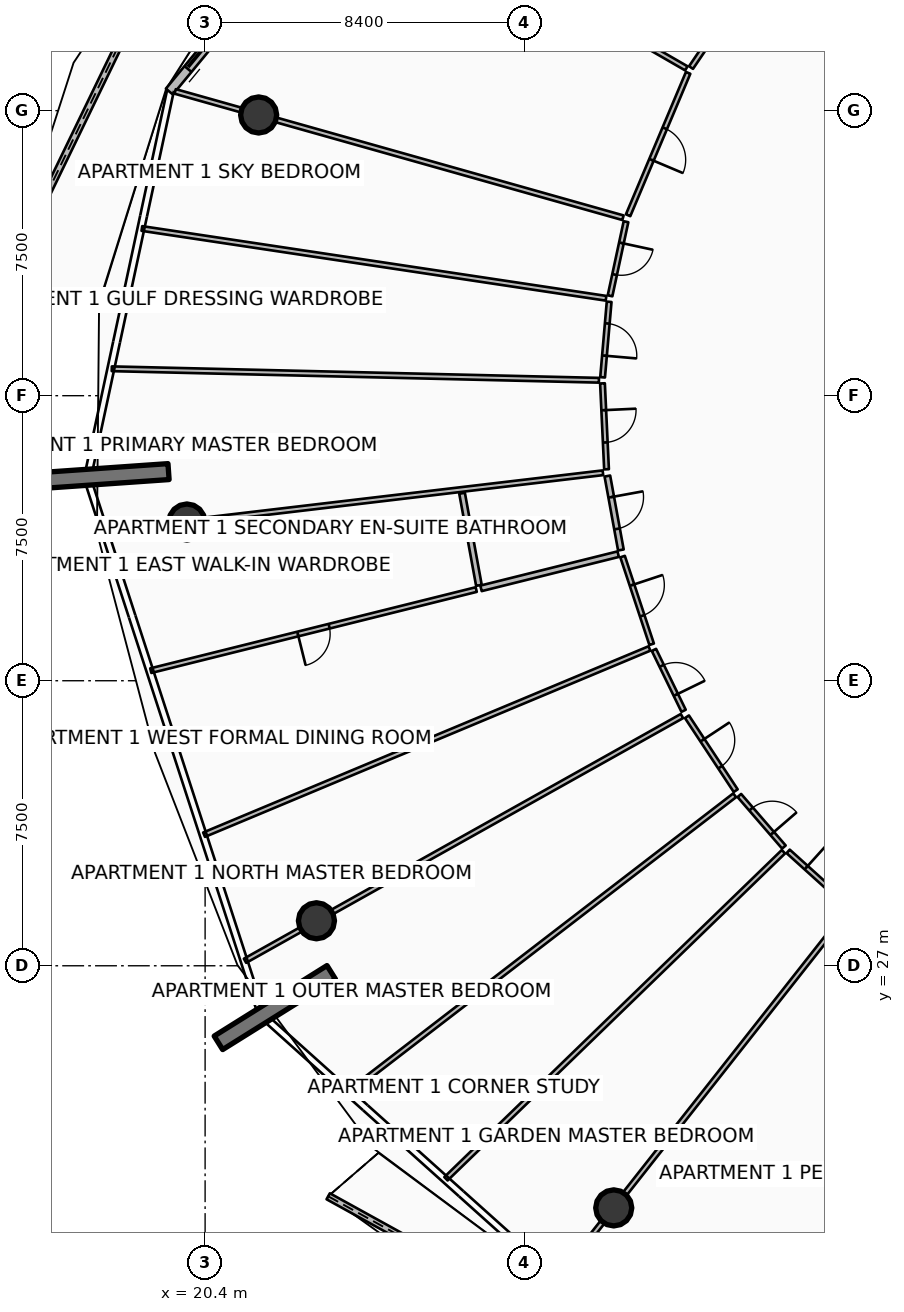
"""IFC4 building model, lengths in metres.
Left out: names, types, materials, properties, quantities, classifications, styles, units other than length and angle.
Written with IfcOpenShell. Run it as: python <this file> out.ifc"""

import sys

from ifc_helpers import new_model, si_unit, direction, frame, frame_2d, origin, origin_2d, place, context, subcontext, project, spatial, polyline, rectangle, circle, outline, extrude, element, fill, save


model = new_model("IFC4")
c1 = context("Model", 3, precision=1e-05, world=origin(), true_north=direction((0.0, 1.0)))
c2 = subcontext(c1, "Body", "Model", "MODEL_VIEW")
j1 = project(units=[si_unit("LENGTHUNIT", "METRE"), si_unit("PLANEANGLEUNIT", "RADIAN")], contexts=[c1])
p1 = place(None, origin())
s1 = spatial("IfcSite", under=j1, at=p1, CompositionType="ELEMENT")
p2 = place(p1, origin())
s2 = spatial("IfcBuilding", under=s1, at=p2, CompositionType="ELEMENT")
p3 = place(p2, frame((0.0, 0.0, 290.6)))
s3 = spatial("IfcBuildingStorey", under=s2, at=p3, CompositionType="ELEMENT", Elevation=290.6)
p4 = place(p3, frame((19.438, 40.003, 0.0), z_axis=(0.0, 0.0, 1.0), x_axis=(-0.997563824095, -0.069759707979, 0.0)))
e1 = element("IfcWall", 1, at=p4, inside=s3, PredefinedType="SOLIDWALL", context=c2, shape_type="SweptSolid", body=[
    extrude(rectangle(XDim=3.5, YDim=0.42, at=frame_2d((1.75, 0.0))), origin(), (0.0, 0.0, 1.0), 3.85),
])
p5 = place(p3, frame((23.719, 26.827, 0.0), z_axis=(0.0, 0.0, 1.0), x_axis=(-0.848033572426, -0.529942506352, 0.0)))
e2 = element("IfcWall", 2, at=p5, inside=s3, PredefinedType="SOLIDWALL", context=c2, shape_type="SweptSolid", body=[
    extrude(rectangle(XDim=3.5, YDim=0.42, at=frame_2d((1.75, 0.0))), origin(), (0.0, 0.0, 1.0), 3.85),
])
for number, where, z_axis, x_axis in (
    (3, (21.809, 49.387, 0.0), (0.0, 0.0, 1.0), (1.0, 0.0, 0.0)),
    (4, (19.92, 38.677, 0.0), (0.0, 0.0, 1.0), (1.0, 0.0, 0.0)),
    (5, (23.33, 28.184, 0.0), (0.0, 0.0, 1.0), (1.0, 0.0, 0.0)),
    (6, (31.153, 20.629, 0.0), (0.0, 0.0, 1.0), (1.0, 0.0, 0.0)),
):
    element("IfcColumn", number, at=place(p3, frame(where, z_axis=z_axis, x_axis=x_axis)), inside=s3, PredefinedType="COLUMN", context=c2, shape_type="SweptSolid", body=[
        extrude(circle(Radius=0.475, at=origin_2d()), origin(), (0.0, 0.0, 1.0), 3.59),
    ])
p6 = place(p3, frame((20.406, 55.925, 0.0), z_axis=(0.0, 0.0, 1.0), x_axis=(-0.435762237374, -0.900061815921, 0.0)))
e7 = element("IfcWall", 7, at=p6, inside=s3, PredefinedType="PARAPET", context=c2, shape_type="SweptSolid", body=[
    extrude(outline(polyline([(0.0, 0.0), (12.362, 0.0), (12.362, 1.86), (6.181, 1.798), (0.0, 1.632), (0.0, 0.0)])), frame((0.0, 0.09, 0.0), z_axis=(0.0, -1.0, 0.0), x_axis=(1.0, 0.0, 0.0)), (0.0, 0.0, 1.0), 0.18),
])
p7 = place(p3, frame((23.639, 20.935, 0.0), z_axis=(0.0, 0.0, 1.0), x_axis=(0.875454216257, -0.483301060663, 0.0)))
e8 = element("IfcWall", 8, at=p7, inside=s3, PredefinedType="PARAPET", context=c2, shape_type="SweptSolid", body=[
    extrude(outline(polyline([(0.0, 0.0), (12.029, 0.0), (12.029, 1.148), (6.015, 1.127), (0.0, 1.224), (0.0, 0.0)])), frame((0.0, 0.09, 0.0), z_axis=(0.0, -1.0, 0.0), x_axis=(1.0, 0.0, 0.0)), (0.0, 0.0, 1.0), 0.18),
])
p8 = place(p3, frame((26.742, 58.822, 0.0), z_axis=(0.0, 0.0, 1.0), x_axis=(-0.636680093065, -0.771128043255, 0.0)))
e9 = element("IfcWall", 9, at=p8, inside=s3, PredefinedType="SOLIDWALL", context=c2, shape_type="SweptSolid", body=[
    extrude(rectangle(XDim=11.438, YDim=0.24, at=frame_2d((5.719, 0.0))), origin(), (0.0, 0.0, 1.0), 2.54),
])
p9 = place(p8, frame((9.218, 0.0, 0.0)))
e10 = element("IfcOpeningElement", 10, at=p9, cuts=e9, PredefinedType="OPENING", context=c2, shape_type="SweptSolid", body=[
    extrude(rectangle(XDim=1.45, YDim=2.15, at=frame_2d((0.725, 1.075))), frame((0.0, 0.13, 0.0), z_axis=(0.0, -1.0, 0.0), x_axis=(1.0, 0.0, 0.0)), (0.0, 0.0, 1.0), 0.26),
])
p10 = place(p8, frame((0.28, 0.0, 0.65)))
e11 = element("IfcOpeningElement", 11, at=p10, cuts=e9, PredefinedType="OPENING", context=c2, shape_type="SweptSolid", body=[
    extrude(rectangle(XDim=1.6, YDim=1.5, at=frame_2d((0.8, 0.75))), frame((0.0, 0.13, 0.0), z_axis=(0.0, -1.0, 0.0), x_axis=(1.0, 0.0, 0.0)), (0.0, 0.0, 1.0), 0.26),
])
p11 = place(p3, frame((33.063, 50.613, 0.0), z_axis=(0.0, 0.0, 1.0), x_axis=(-0.866292819656, 0.499536535814, 0.0)))
e12 = element("IfcWall", 12, at=p11, inside=s3, PredefinedType="PARTITIONING", context=c2, shape_type="SweptSolid", body=[
    extrude(rectangle(XDim=10.118, YDim=0.125, at=frame_2d((5.059, 0.0))), origin(), (0.0, 0.0, 1.0), 3.03),
])
p12 = place(p3, frame((34.474, 52.536, 0.0), z_axis=(0.0, 0.0, 1.0), x_axis=(-0.560794078194, -0.827955313929, 0.0)))
e13 = element("IfcWall", 13, at=p12, inside=s3, PredefinedType="PARTITIONING", context=c2, shape_type="SweptSolid", body=[
    extrude(rectangle(XDim=2.296, YDim=0.125, at=frame_2d((1.148, 0.0))), origin(), (0.0, 0.0, 1.0), 2.957),
])
p13 = place(p12, frame((0.723, 0.0, 0.0)))
e14 = element("IfcOpeningElement", 14, at=p13, cuts=e13, PredefinedType="OPENING", context=c2, shape_type="SweptSolid", body=[
    extrude(rectangle(XDim=0.85, YDim=2.06, at=frame_2d((0.425, 1.03))), frame((0.0, 0.073, 0.0), z_axis=(0.0, -1.0, 0.0), x_axis=(1.0, 0.0, 0.0)), (0.0, 0.0, 1.0), 0.145),
])
p14 = place(p3, frame((33.11, 50.494, 0.0), z_axis=(0.0, 0.0, 1.0), x_axis=(-0.388491824698, -0.921452170296, 0.0)))
e15 = element("IfcWall", 15, at=p14, inside=s3, PredefinedType="PARTITIONING", context=c2, shape_type="SweptSolid", body=[
    extrude(rectangle(XDim=4.066, YDim=0.125, at=frame_2d((2.033, 0.0))), origin(), (0.0, 0.0, 1.0), 2.957),
])
p15 = place(p14, frame((1.583, 0.0, 0.0)))
e16 = element("IfcOpeningElement", 16, at=p15, cuts=e15, PredefinedType="OPENING", context=c2, shape_type="SweptSolid", body=[
    extrude(rectangle(XDim=0.9, YDim=2.08, at=frame_2d((0.45, 1.04))), frame((0.0, 0.073, 0.0), z_axis=(0.0, -1.0, 0.0), x_axis=(1.0, 0.0, 0.0)), (0.0, 0.0, 1.0), 0.145),
])
p16 = place(p3, frame((31.396, 46.683, 0.0), z_axis=(0.0, 0.0, 1.0), x_axis=(-0.962453683352, 0.271445956688, 0.0)))
e17 = element("IfcWall", 17, at=p16, inside=s3, PredefinedType="PARTITIONING", context=c2, shape_type="SweptSolid", body=[
    extrude(rectangle(XDim=12.244, YDim=0.125, at=frame_2d((6.122, 0.0))), origin(), (0.0, 0.0, 1.0), 2.957),
])
p17 = place(p3, frame((30.95, 44.563, 0.0), z_axis=(0.0, 0.0, 1.0), x_axis=(-0.988886709817, 0.148671029955, 0.0)))
e18 = element("IfcWall", 18, at=p17, inside=s3, PredefinedType="PARTITIONING", context=c2, shape_type="SweptSolid", body=[
    extrude(rectangle(XDim=12.351, YDim=0.125, at=frame_2d((6.175, 0.0))), origin(), (0.0, 0.0, 1.0), 3.03),
])
p18 = place(p3, frame((30.763, 42.406, 0.0), z_axis=(0.0, 0.0, 1.0), x_axis=(-0.99972256554, 0.023554021933, 0.0)))
e19 = element("IfcWall", 19, at=p18, inside=s3, PredefinedType="PARTITIONING", context=c2, shape_type="SweptSolid", body=[
    extrude(rectangle(XDim=12.822, YDim=0.125, at=frame_2d((6.411, 0.0))), origin(), (0.0, 0.0, 1.0), 3.03),
])
p19 = place(p3, frame((31.475, 46.577, 0.0), z_axis=(0.0, 0.0, 1.0), x_axis=(-0.210482265154, -0.977597675967, 0.0)))
e20 = element("IfcWall", 20, at=p19, inside=s3, PredefinedType="PARTITIONING", context=c2, shape_type="SweptSolid", body=[
    extrude(rectangle(XDim=1.994, YDim=0.125, at=frame_2d((0.997, 0.0))), origin(), (0.0, 0.0, 1.0), 2.957),
])
p20 = place(p19, frame((0.572, 0.0, 0.0)))
e21 = element("IfcOpeningElement", 21, at=p20, cuts=e20, PredefinedType="OPENING", context=c2, shape_type="SweptSolid", body=[
    extrude(rectangle(XDim=0.85, YDim=2.06, at=frame_2d((0.425, 1.03))), frame((0.0, 0.073, 0.0), z_axis=(0.0, -1.0, 0.0), x_axis=(1.0, 0.0, 0.0)), (0.0, 0.0, 1.0), 0.145),
])
p21 = place(p3, frame((31.032, 44.47, 0.0), z_axis=(0.0, 0.0, 1.0), x_axis=(-0.086328422667, -0.996266733079, 0.0)))
e22 = element("IfcWall", 22, at=p21, inside=s3, PredefinedType="PARTITIONING", context=c2, shape_type="SweptSolid", body=[
    extrude(rectangle(XDim=1.994, YDim=0.125, at=frame_2d((0.997, 0.0))), origin(), (0.0, 0.0, 1.0), 3.03),
])
p22 = place(p21, frame((0.572, 0.0, 0.0)))
e23 = element("IfcOpeningElement", 23, at=p22, cuts=e22, PredefinedType="OPENING", context=c2, shape_type="SweptSolid", body=[
    extrude(rectangle(XDim=0.85, YDim=2.06, at=frame_2d((0.425, 1.03))), frame((0.0, 0.073, 0.0), z_axis=(0.0, -1.0, 0.0), x_axis=(1.0, 0.0, 0.0)), (0.0, 0.0, 1.0), 0.145),
])
p23 = place(p3, frame((30.857, 42.324, 0.0), z_axis=(0.0, 0.0, 1.0), x_axis=(0.047042266611, -0.998892899741, 0.0)))
e24 = element("IfcWall", 24, at=p23, inside=s3, PredefinedType="PARTITIONING", context=c2, shape_type="SweptSolid", body=[
    extrude(rectangle(XDim=2.263, YDim=0.125, at=frame_2d((1.131, 0.0))), origin(), (0.0, 0.0, 1.0), 2.957),
])
p24 = place(p23, frame((0.706, 0.0, 0.0)))
e25 = element("IfcOpeningElement", 25, at=p24, cuts=e24, PredefinedType="OPENING", context=c2, shape_type="SweptSolid", body=[
    extrude(rectangle(XDim=0.85, YDim=2.06, at=frame_2d((0.425, 1.03))), frame((0.0, 0.073, 0.0), z_axis=(0.0, -1.0, 0.0), x_axis=(1.0, 0.0, 0.0)), (0.0, 0.0, 1.0), 0.145),
])
p25 = place(p3, frame((30.868, 39.972, 0.0), z_axis=(0.0, 0.0, 1.0), x_axis=(-0.993068921398, -0.117533473328, 0.0)))
e26 = element("IfcWall", 26, at=p25, inside=s3, PredefinedType="PARTITIONING", context=c2, shape_type="SweptSolid", body=[
    extrude(rectangle(XDim=13.178, YDim=0.125, at=frame_2d((6.589, 0.0))), origin(), (0.0, 0.0, 1.0), 2.957),
])
p26 = place(p3, frame((30.985, 39.885, 0.0), z_axis=(0.0, 0.0, 1.0), x_axis=(0.180015292758, -0.983663811662, 0.0)))
e27 = element("IfcWall", 27, at=p26, inside=s3, PredefinedType="PARTITIONING", context=c2, shape_type="SweptSolid", body=[
    extrude(rectangle(XDim=1.977, YDim=0.15, at=frame_2d((0.989, 0.0))), origin(), (0.0, 0.0, 1.0), 2.957),
])
p27 = place(p26, frame((0.564, 0.0, 0.0)))
e28 = element("IfcOpeningElement", 28, at=p27, cuts=e27, PredefinedType="OPENING", context=c2, shape_type="SweptSolid", body=[
    extrude(rectangle(XDim=0.85, YDim=2.06, at=frame_2d((0.425, 1.03))), frame((0.0, 0.085, 0.0), z_axis=(0.0, -1.0, 0.0), x_axis=(1.0, 0.0, 0.0)), (0.0, 0.0, 1.0), 0.17),
])
p28 = place(p3, frame((27.162, 39.433, 0.0), z_axis=(0.0, 0.0, 1.0), x_axis=(0.180045053774, -0.983658364785, 0.0)))
e29 = element("IfcWall", 29, at=p28, inside=s3, PredefinedType="PARTITIONING", context=c2, shape_type="SweptSolid", body=[
    extrude(rectangle(XDim=2.464, YDim=0.15, at=frame_2d((1.232, 0.0))), origin(), (0.0, 0.0, 1.0), 2.957),
])
p29 = place(p3, frame((31.27, 37.83, 0.0), z_axis=(0.0, 0.0, 1.0), x_axis=(-0.97033137229, -0.241778882348, 0.0)))
e30 = element("IfcWall", 30, at=p29, inside=s3, PredefinedType="PARTITIONING", context=c2, shape_type="SweptSolid", body=[
    extrude(rectangle(XDim=3.72, YDim=0.15, at=frame_2d((1.86, 0.0))), origin(), (0.0, 0.0, 1.0), 3.03),
])
p30 = place(p3, frame((27.534, 36.899, 0.0), z_axis=(0.0, 0.0, 1.0), x_axis=(-0.970319606555, -0.241826096887, 0.0)))
e31 = element("IfcWall", 31, at=p30, inside=s3, PredefinedType="PARTITIONING", context=c2, shape_type="SweptSolid", body=[
    extrude(rectangle(XDim=8.826, YDim=0.125, at=frame_2d((4.413, 0.0))), origin(), (0.0, 0.0, 1.0), 3.03),
])
p31 = place(p30, frame((3.988, 0.0, 0.0)))
e32 = element("IfcOpeningElement", 32, at=p31, cuts=e31, PredefinedType="OPENING", context=c2, shape_type="SweptSolid", body=[
    extrude(rectangle(XDim=0.85, YDim=2.06, at=frame_2d((0.425, 1.03))), frame((0.0, 0.073, 0.0), z_axis=(0.0, -1.0, 0.0), x_axis=(1.0, 0.0, 0.0)), (0.0, 0.0, 1.0), 0.145),
])
p32 = place(p3, frame((32.093, 35.349, 0.0), z_axis=(0.0, 0.0, 1.0), x_axis=(-0.922603134387, -0.385750510588, 0.0)))
e33 = element("IfcWall", 33, at=p32, inside=s3, PredefinedType="PARTITIONING", context=c2, shape_type="SweptSolid", body=[
    extrude(rectangle(XDim=12.703, YDim=0.125, at=frame_2d((6.352, 0.0))), origin(), (0.0, 0.0, 1.0), 3.03),
])
p33 = place(p3, frame((31.385, 37.767, 0.0), z_axis=(0.0, 0.0, 1.0), x_axis=(0.314690560305, -0.94919431691, 0.0)))
e34 = element("IfcWall", 34, at=p33, inside=s3, PredefinedType="PARTITIONING", context=c2, shape_type="SweptSolid", body=[
    extrude(rectangle(XDim=2.431, YDim=0.125, at=frame_2d((1.215, 0.0))), origin(), (0.0, 0.0, 1.0), 3.03),
])
p34 = place(p33, frame((0.79, 0.0, 0.0)))
e35 = element("IfcOpeningElement", 35, at=p34, cuts=e34, PredefinedType="OPENING", context=c2, shape_type="SweptSolid", body=[
    extrude(rectangle(XDim=0.85, YDim=2.06, at=frame_2d((0.425, 1.03))), frame((0.0, 0.073, 0.0), z_axis=(0.0, -1.0, 0.0), x_axis=(1.0, 0.0, 0.0)), (0.0, 0.0, 1.0), 0.145),
])
p35 = place(p3, frame((32.21, 35.312, 0.0), z_axis=(0.0, 0.0, 1.0), x_axis=(0.437932532195, -0.899007840481, 0.0)))
e36 = element("IfcWall", 36, at=p35, inside=s3, PredefinedType="PARTITIONING", context=c2, shape_type="SweptSolid", body=[
    extrude(rectangle(XDim=1.783, YDim=0.125, at=frame_2d((0.891, 0.0))), origin(), (0.0, 0.0, 1.0), 2.957),
])
p36 = place(p35, frame((0.466, 0.0, 0.0)))
e37 = element("IfcOpeningElement", 37, at=p36, cuts=e36, PredefinedType="OPENING", context=c2, shape_type="SweptSolid", body=[
    extrude(rectangle(XDim=0.85, YDim=2.06, at=frame_2d((0.425, 1.03))), frame((0.0, 0.073, 0.0), z_axis=(0.0, -1.0, 0.0), x_axis=(1.0, 0.0, 0.0)), (0.0, 0.0, 1.0), 0.145),
])
p37 = place(p3, frame((32.948, 33.57, 0.0), z_axis=(0.0, 0.0, 1.0), x_axis=(-0.872495274329, -0.488622549903, 0.0)))
e38 = element("IfcWall", 38, at=p37, inside=s3, PredefinedType="PARTITIONING", context=c2, shape_type="SweptSolid", body=[
    extrude(rectangle(XDim=13.178, YDim=0.125, at=frame_2d((6.589, 0.0))), origin(), (0.0, 0.0, 1.0), 2.957),
])
p38 = place(p3, frame((37.319, 28.452, 0.0), z_axis=(0.0, 0.0, 1.0), x_axis=(-0.619095191857, -0.785315951334, 0.0)))
e39 = element("IfcWall", 39, at=p38, inside=s3, PredefinedType="PARTITIONING", context=c2, shape_type="SweptSolid", body=[
    extrude(rectangle(XDim=12.344, YDim=0.125, at=frame_2d((6.172, 0.0))), origin(), (0.0, 0.0, 1.0), 2.957),
])
p39 = place(p3, frame((34.335, 31.486, 0.0), z_axis=(0.0, 0.0, 1.0), x_axis=(-0.792560168622, -0.609793718493, 0.0)))
e40 = element("IfcWall", 40, at=p39, inside=s3, PredefinedType="PARTITIONING", context=c2, shape_type="SweptSolid", body=[
    extrude(rectangle(XDim=12.8, YDim=0.125, at=frame_2d((6.4, 0.0))), origin(), (0.0, 0.0, 1.0), 3.03),
])
p40 = place(p3, frame((35.618, 30.001, 0.0), z_axis=(0.0, 0.0, 1.0), x_axis=(-0.718124899013, -0.695914239988, 0.0)))
e41 = element("IfcWall", 41, at=p40, inside=s3, PredefinedType="PARTITIONING", context=c2, shape_type="SweptSolid", body=[
    extrude(rectangle(XDim=12.366, YDim=0.125, at=frame_2d((6.183, 0.0))), origin(), (0.0, 0.0, 1.0), 3.03),
])
p41 = place(p3, frame((33.079, 33.552, 0.0), z_axis=(0.0, 0.0, 1.0), x_axis=(0.550607173666, -0.83476448194, 0.0)))
e42 = element("IfcWall", 42, at=p41, inside=s3, PredefinedType="PARTITIONING", context=c2, shape_type="SweptSolid", body=[
    extrude(rectangle(XDim=2.33, YDim=0.125, at=frame_2d((1.165, 0.0))), origin(), (0.0, 0.0, 1.0), 2.957),
])
p42 = place(p41, frame((0.74, 0.0, 0.0)))
e43 = element("IfcOpeningElement", 43, at=p42, cuts=e42, PredefinedType="OPENING", context=c2, shape_type="SweptSolid", body=[
    extrude(rectangle(XDim=0.85, YDim=2.06, at=frame_2d((0.425, 1.03))), frame((0.0, 0.073, 0.0), z_axis=(0.0, -1.0, 0.0), x_axis=(1.0, 0.0, 0.0)), (0.0, 0.0, 1.0), 0.145),
])
p43 = place(p3, frame((34.458, 31.48, 0.0), z_axis=(0.0, 0.0, 1.0), x_axis=(0.653882286754, -0.756596295966, 0.0)))
e44 = element("IfcWall", 44, at=p43, inside=s3, PredefinedType="PARTITIONING", context=c2, shape_type="SweptSolid", body=[
    extrude(rectangle(XDim=1.792, YDim=0.125, at=frame_2d((0.896, 0.0))), origin(), (0.0, 0.0, 1.0), 3.03),
])
p44 = place(p43, frame((0.471, 0.0, 0.0)))
e45 = element("IfcOpeningElement", 45, at=p44, cuts=e44, PredefinedType="OPENING", context=c2, shape_type="SweptSolid", body=[
    extrude(rectangle(XDim=0.85, YDim=2.06, at=frame_2d((0.425, 1.03))), frame((0.0, 0.073, 0.0), z_axis=(0.0, -1.0, 0.0), x_axis=(1.0, 0.0, 0.0)), (0.0, 0.0, 1.0), 0.145),
])
p45 = place(p3, frame((35.742, 30.01, 0.0), z_axis=(0.0, 0.0, 1.0), x_axis=(0.742260909421, -0.670110992557, 0.0)))
e46 = element("IfcWall", 46, at=p45, inside=s3, PredefinedType="PARTITIONING", context=c2, shape_type="SweptSolid", body=[
    extrude(rectangle(XDim=2.128, YDim=0.125, at=frame_2d((1.064, 0.0))), origin(), (0.0, 0.0, 1.0), 2.957),
])
p46 = place(p45, frame((0.639, 0.0, 0.0)))
e47 = element("IfcOpeningElement", 47, at=p46, cuts=e46, PredefinedType="OPENING", context=c2, shape_type="SweptSolid", body=[
    extrude(rectangle(XDim=0.85, YDim=2.06, at=frame_2d((0.425, 1.03))), frame((0.0, 0.073, 0.0), z_axis=(0.0, -1.0, 0.0), x_axis=(1.0, 0.0, 0.0)), (0.0, 0.0, 1.0), 0.145),
])
p47 = place(p9, origin())
e48 = element("IfcDoor", 48, at=p47, inside=s3, OperationType="DOUBLE_DOOR_SLIDING", PredefinedType="DOOR", context=c2, shape_type="SweptSolid", body=[
    extrude(rectangle(XDim=1.45, YDim=2.15, at=frame_2d((0.725, 1.075))), frame((0.0, 0.025, 0.0), z_axis=(0.0, -1.0, 0.0), x_axis=(1.0, 0.0, 0.0)), (0.0, 0.0, 1.0), 0.05),
])
fill(e10, e48)
p48 = place(p15, origin())
e49 = element("IfcDoor", 49, at=p48, inside=s3, OperationType="SINGLE_SWING_RIGHT", PredefinedType="DOOR", context=c2, shape_type="SweptSolid", body=[
    extrude(rectangle(XDim=0.9, YDim=2.08, at=frame_2d((0.45, 1.04))), frame((0.0, 0.025, 0.0), z_axis=(0.0, -1.0, 0.0), x_axis=(1.0, 0.0, 0.0)), (0.0, 0.0, 1.0), 0.05),
])
fill(e16, e49)
p49 = place(p20, origin())
e50 = element("IfcDoor", 50, at=p49, inside=s3, OperationType="SINGLE_SWING_LEFT", PredefinedType="DOOR", context=c2, shape_type="SweptSolid", body=[
    extrude(rectangle(XDim=0.85, YDim=2.06, at=frame_2d((0.425, 1.03))), frame((0.0, 0.025, 0.0), z_axis=(0.0, -1.0, 0.0), x_axis=(1.0, 0.0, 0.0)), (0.0, 0.0, 1.0), 0.05),
])
fill(e21, e50)
p50 = place(p22, origin())
e51 = element("IfcDoor", 51, at=p50, inside=s3, OperationType="SINGLE_SWING_RIGHT", PredefinedType="DOOR", context=c2, shape_type="SweptSolid", body=[
    extrude(rectangle(XDim=0.85, YDim=2.06, at=frame_2d((0.425, 1.03))), frame((0.0, 0.025, 0.0), z_axis=(0.0, -1.0, 0.0), x_axis=(1.0, 0.0, 0.0)), (0.0, 0.0, 1.0), 0.05),
])
fill(e23, e51)
p51 = place(p24, origin())
e52 = element("IfcDoor", 52, at=p51, inside=s3, OperationType="SINGLE_SWING_LEFT", PredefinedType="DOOR", context=c2, shape_type="SweptSolid", body=[
    extrude(rectangle(XDim=0.85, YDim=2.06, at=frame_2d((0.425, 1.03))), frame((0.0, 0.025, 0.0), z_axis=(0.0, -1.0, 0.0), x_axis=(1.0, 0.0, 0.0)), (0.0, 0.0, 1.0), 0.05),
])
fill(e25, e52)
p52 = place(p27, origin())
e53 = element("IfcDoor", 53, at=p52, inside=s3, OperationType="SINGLE_SWING_LEFT", PredefinedType="DOOR", context=c2, shape_type="SweptSolid", body=[
    extrude(rectangle(XDim=0.85, YDim=2.06, at=frame_2d((0.425, 1.03))), frame((0.0, 0.025, 0.0), z_axis=(0.0, -1.0, 0.0), x_axis=(1.0, 0.0, 0.0)), (0.0, 0.0, 1.0), 0.05),
])
fill(e28, e53)
p53 = place(p31, origin())
e54 = element("IfcDoor", 54, at=p53, inside=s3, OperationType="SINGLE_SWING_RIGHT", PredefinedType="DOOR", context=c2, shape_type="SweptSolid", body=[
    extrude(rectangle(XDim=0.85, YDim=2.06, at=frame_2d((0.425, 1.03))), frame((0.0, 0.025, 0.0), z_axis=(0.0, -1.0, 0.0), x_axis=(1.0, 0.0, 0.0)), (0.0, 0.0, 1.0), 0.05),
])
fill(e32, e54)
p54 = place(p34, origin())
e55 = element("IfcDoor", 55, at=p54, inside=s3, OperationType="SINGLE_SWING_LEFT", PredefinedType="DOOR", context=c2, shape_type="SweptSolid", body=[
    extrude(rectangle(XDim=0.85, YDim=2.06, at=frame_2d((0.425, 1.03))), frame((0.0, 0.025, 0.0), z_axis=(0.0, -1.0, 0.0), x_axis=(1.0, 0.0, 0.0)), (0.0, 0.0, 1.0), 0.05),
])
fill(e35, e55)
p55 = place(p36, origin())
e56 = element("IfcDoor", 56, at=p55, inside=s3, OperationType="SINGLE_SWING_RIGHT", PredefinedType="DOOR", context=c2, shape_type="SweptSolid", body=[
    extrude(rectangle(XDim=0.85, YDim=2.06, at=frame_2d((0.425, 1.03))), frame((0.0, 0.025, 0.0), z_axis=(0.0, -1.0, 0.0), x_axis=(1.0, 0.0, 0.0)), (0.0, 0.0, 1.0), 0.05),
])
fill(e37, e56)
p56 = place(p42, origin())
e57 = element("IfcDoor", 57, at=p56, inside=s3, OperationType="SINGLE_SWING_LEFT", PredefinedType="DOOR", context=c2, shape_type="SweptSolid", body=[
    extrude(rectangle(XDim=0.85, YDim=2.06, at=frame_2d((0.425, 1.03))), frame((0.0, 0.025, 0.0), z_axis=(0.0, -1.0, 0.0), x_axis=(1.0, 0.0, 0.0)), (0.0, 0.0, 1.0), 0.05),
])
fill(e43, e57)
p57 = place(p44, origin())
e58 = element("IfcDoor", 58, at=p57, inside=s3, OperationType="SINGLE_SWING_RIGHT", PredefinedType="DOOR", context=c2, shape_type="SweptSolid", body=[
    extrude(rectangle(XDim=0.85, YDim=2.06, at=frame_2d((0.425, 1.03))), frame((0.0, 0.025, 0.0), z_axis=(0.0, -1.0, 0.0), x_axis=(1.0, 0.0, 0.0)), (0.0, 0.0, 1.0), 0.05),
])
fill(e45, e58)
p58 = place(p46, origin())
e59 = element("IfcDoor", 59, at=p58, inside=s3, OperationType="SINGLE_SWING_LEFT", PredefinedType="DOOR", context=c2, shape_type="SweptSolid", body=[
    extrude(rectangle(XDim=0.85, YDim=2.06, at=frame_2d((0.425, 1.03))), frame((0.0, 0.025, 0.0), z_axis=(0.0, -1.0, 0.0), x_axis=(1.0, 0.0, 0.0)), (0.0, 0.0, 1.0), 0.05),
])
fill(e47, e59)
save(model, sys.argv[1])
